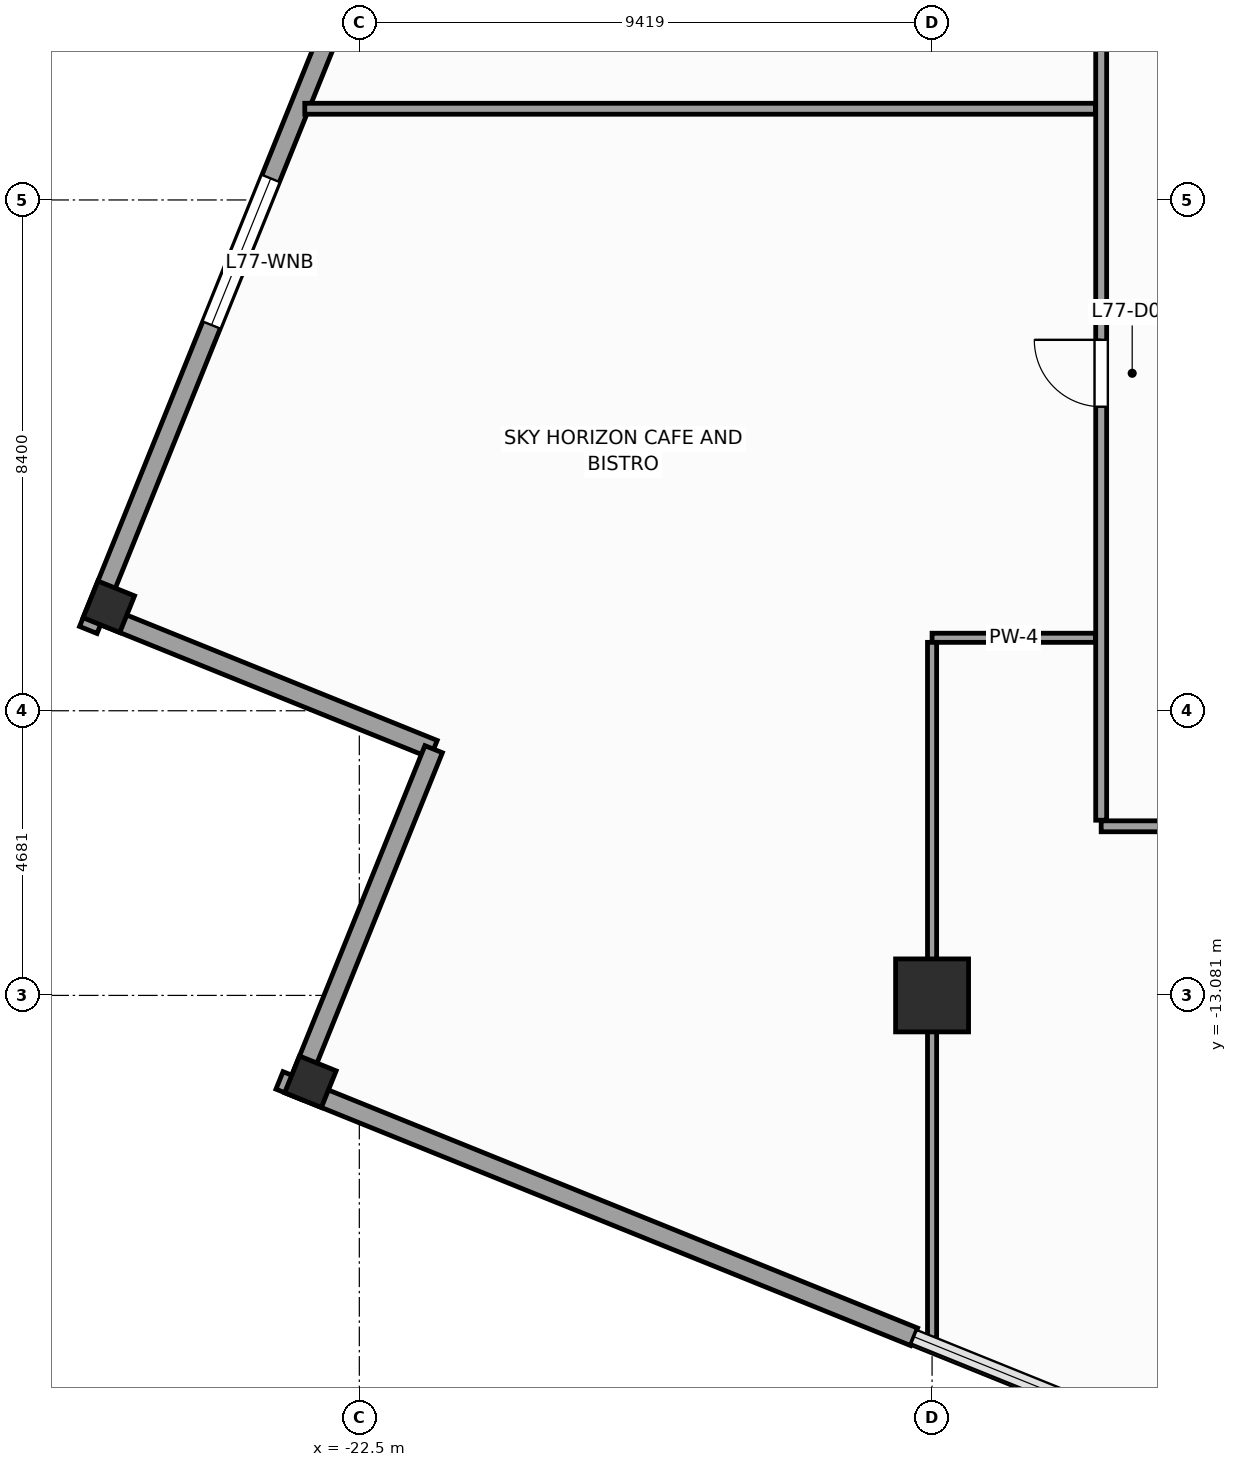
"""IFC4 building model, lengths in metres.
Left out: names, types, materials, properties, quantities, classifications, styles, units other than length and angle.
Written with IfcOpenShell. Run it as: python <this file> out.ifc"""

import sys

from ifc_helpers import new_model, si_unit, direction, frame, frame_2d, origin, origin_2d, place, context, subcontext, project, spatial, rectangle, extrude, source, transform, mapped, element, fill, save


model = new_model("IFC4")
c1 = context("Model", 3, precision=1e-05, world=origin(), true_north=direction((0.0, 1.0)))
c2 = subcontext(c1, "Body", "Model", "MODEL_VIEW")
j1 = project(units=[si_unit("LENGTHUNIT", "METRE"), si_unit("PLANEANGLEUNIT", "RADIAN")], contexts=[c1])
p1 = place(None, origin())
s1 = spatial("IfcSite", under=j1, at=p1, CompositionType="ELEMENT")
p2 = place(p1, origin())
s2 = spatial("IfcBuilding", under=s1, at=p2, CompositionType="ELEMENT")
p3 = place(p2, frame((0.0, 0.0, 312.0)))
s3 = spatial("IfcBuildingStorey", under=s2, at=p3, CompositionType="ELEMENT", Elevation=312.0)
m1 = source(origin(), c2, "Body", "SweptSolid", [
    extrude(rectangle(XDim=1.2, YDim=1.2, at=origin_2d()), origin(), (0.0, 0.0, 1.0), 4.8),
])
p4 = place(p3, frame((-13.081, -13.081, 0.0), z_axis=(0.0, 0.0, 1.0), x_axis=(1.0, 0.0, 0.0)))
e1 = element("IfcColumn", 1, at=p4, inside=s3, PredefinedType="COLUMN", context=c2, shape_type="MappedRepresentation", body=[
    mapped(m1, transform((0.0, 0.0, 0.0), scale=1.0)),
])
m2 = source(origin(), c2, "Body", "SweptSolid", [
    extrude(rectangle(XDim=0.65, YDim=0.65, at=origin_2d()), origin(), (0.0, 0.0, 1.0), 4.8),
])
for number, where, z_axis, x_axis in (
    (2, (-26.62, -6.69, 0.0), (0.0, 0.0, 1.0), (0.375, 0.927, 0.0)),
    (3, (-23.304, -14.501, 0.0), (0.0, 0.0, 1.0), (0.375, 0.927, 0.0)),
):
    element("IfcColumn", number, at=place(p3, frame(where, z_axis=z_axis, x_axis=x_axis)), inside=s3, PredefinedType="COLUMN", context=c2, shape_type="MappedRepresentation", body=[
        mapped(m2, transform((0.0, 0.0, 0.0), scale=1.0)),
    ])
p5 = place(p3, frame((-26.841, -6.784, 0.0), z_axis=(0.0, 0.0, 1.0), x_axis=(0.927171722085, -0.374636620962, 0.0)))
e4 = element("IfcWall", 4, at=p5, inside=s3, PredefinedType="STANDARD", context=c2, shape_type="SweptSolid", body=[
    extrude(rectangle(XDim=6.0, YDim=0.31, at=frame_2d((3.0, 0.0))), origin(), (0.0, 0.0, 1.0), 3.85),
])
p6 = place(p3, frame((-21.278, -9.032, 0.0), z_axis=(0.0, 0.0, 1.0), x_axis=(-0.374602739196, -0.927185411764, 0.0)))
e5 = element("IfcWall", 5, at=p6, inside=s3, PredefinedType="STANDARD", context=c2, shape_type="SweptSolid", body=[
    extrude(rectangle(XDim=6.155, YDim=0.31, at=frame_2d((3.078, 0.0))), origin(), (0.0, 0.0, 1.0), 4.55),
])
p7 = place(p3, frame((-20.343, 9.298, 0.0), z_axis=(0.0, 0.0, 1.0), x_axis=(-0.374607087443, -0.927183654967, 0.0)))
e6 = element("IfcWall", 6, at=p7, inside=s3, PredefinedType="STANDARD", context=c2, shape_type="SweptSolid", body=[
    extrude(rectangle(XDim=17.655, YDim=0.31, at=frame_2d((8.828, 0.0))), origin(), (0.0, 0.0, 1.0), 3.95),
])
p8 = place(p7, frame((9.646, 0.0, 0.65)))
e7 = element("IfcOpeningElement", 7, at=p8, cuts=e6, PredefinedType="OPENING", context=c2, shape_type="SweptSolid", body=[
    extrude(rectangle(XDim=2.6, YDim=3.0, at=frame_2d((1.3, 1.5))), frame((0.0, 0.165, 0.0), z_axis=(0.0, -1.0, 0.0), x_axis=(1.0, 0.0, 0.0)), (0.0, 0.0, 1.0), 0.33),
])
p9 = place(p3, frame((-23.813, -14.479, 0.0), z_axis=(0.0, 0.0, 1.0), x_axis=(0.927178527544, -0.374619777991, 0.0)))
e8 = element("IfcWall", 8, at=p9, inside=s3, PredefinedType="STANDARD", context=c2, shape_type="SweptSolid", body=[
    extrude(rectangle(XDim=11.255, YDim=0.31, at=frame_2d((5.627, 0.0))), origin(), (0.0, 0.0, 1.0), 3.95),
])
p10 = place(p3, frame((-10.3, -10.3, 0.0), z_axis=(0.0, 0.0, 1.0), x_axis=(1.0, 0.0, 0.0)))
e9 = element("IfcWall", 9, at=p10, inside=s3, PredefinedType="PARTITIONING", context=c2, shape_type="SweptSolid", body=[
    extrude(rectangle(XDim=21.2, YDim=0.18, at=frame_2d((10.6, 0.0))), origin(), (0.0, 0.0, 1.0), 4.55),
])
p11 = place(p10, frame((10.514, 0.0, 0.0)))
e10 = element("IfcOpeningElement", 10, at=p11, cuts=e9, PredefinedType="OPENING", context=c2, shape_type="SweptSolid", body=[
    extrude(rectangle(XDim=0.95, YDim=2.1, at=frame_2d((0.475, 1.05))), frame((0.0, 0.1, 0.0), z_axis=(0.0, -1.0, 0.0), x_axis=(1.0, 0.0, 0.0)), (0.0, 0.0, 1.0), 0.2),
])
p12 = place(p10, frame((16.236, 0.0, 0.0)))
e11 = element("IfcOpeningElement", 11, at=p12, cuts=e9, PredefinedType="OPENING", context=c2, shape_type="SweptSolid", body=[
    extrude(rectangle(XDim=1.1, YDim=2.2, at=frame_2d((0.55, 1.1))), frame((0.0, 0.1, 0.0), z_axis=(0.0, -1.0, 0.0), x_axis=(1.0, 0.0, 0.0)), (0.0, 0.0, 1.0), 0.2),
])
p13 = place(p10, frame((4.415, 0.0, 0.0)))
e12 = element("IfcOpeningElement", 12, at=p13, cuts=e9, PredefinedType="OPENING", context=c2, shape_type="SweptSolid", body=[
    extrude(rectangle(XDim=1.1, YDim=2.2, at=frame_2d((0.55, 1.1))), frame((0.0, 0.1, 0.0), z_axis=(0.0, -1.0, 0.0), x_axis=(1.0, 0.0, 0.0)), (0.0, 0.0, 1.0), 0.2),
])
p14 = place(p3, frame((-10.3, -10.2, 0.0), z_axis=(0.0, 0.0, 1.0), x_axis=(0.0, 1.0, 0.0)))
e13 = element("IfcWall", 13, at=p14, inside=s3, PredefinedType="PARTITIONING", context=c2, shape_type="SweptSolid", body=[
    extrude(rectangle(XDim=21.0, YDim=0.18, at=frame_2d((10.5, 0.0))), origin(), (0.0, 0.0, 1.0), 4.55),
])
p15 = place(p14, frame((6.8, 0.0, 0.0)))
e14 = element("IfcOpeningElement", 14, at=p15, cuts=e13, PredefinedType="OPENING", context=c2, shape_type="SweptSolid", body=[
    extrude(rectangle(XDim=1.1, YDim=2.2, at=frame_2d((0.55, 1.1))), frame((0.0, 0.1, 0.0), z_axis=(0.0, -1.0, 0.0), x_axis=(1.0, 0.0, 0.0)), (0.0, 0.0, 1.0), 0.2),
])
p16 = place(p3, frame((-10.395, 1.5, 0.0), z_axis=(0.0, 0.0, 1.0), x_axis=(-1.0, 0.0, 0.0)))
e15 = element("IfcWall", 15, at=p16, inside=s3, PredefinedType="PARTITIONING", context=c2, shape_type="SweptSolid", body=[
    extrude(rectangle(XDim=13.002, YDim=0.18, at=frame_2d((6.501, 0.0))), origin(), (0.0, 0.0, 1.0), 4.55),
])
p17 = place(p3, frame((-10.395, -7.2, 0.0), z_axis=(0.0, 0.0, 1.0), x_axis=(-1.0, 0.0, 0.0)))
e16 = element("IfcWall", 16, at=p17, inside=s3, PredefinedType="PARTITIONING", context=c2, shape_type="SweptSolid", body=[
    extrude(rectangle(XDim=2.686, YDim=0.15, at=frame_2d((1.343, 0.0))), origin(), (0.0, 0.0, 1.0), 4.55),
])
p18 = place(p3, frame((-13.081, -7.275, 0.0), z_axis=(0.0, 0.0, 1.0), x_axis=(0.0, -1.0, 0.0)))
e17 = element("IfcWall", 17, at=p18, inside=s3, PredefinedType="PARTITIONING", context=c2, shape_type="SweptSolid", body=[
    extrude(rectangle(XDim=11.443, YDim=0.15, at=frame_2d((5.721, 0.0))), origin(), (0.0, 0.0, 1.0), 3.65),
])
m3 = source(origin(), c2, "Body", "SweptSolid", [
    extrude(rectangle(XDim=2.6, YDim=3.0, at=frame_2d((1.3, 1.5))), frame((0.0, 0.03, 0.0), z_axis=(0.0, -1.0, 0.0), x_axis=(1.0, 0.0, 0.0)), (0.0, 0.0, 1.0), 0.06),
])
p19 = place(p8, origin())
e18 = element("IfcWindow", 18, at=p19, inside=s3, PartitioningType="SINGLE_PANEL", PredefinedType="WINDOW", context=c2, shape_type="MappedRepresentation", body=[
    mapped(m3, transform((0.0, 0.0, 0.0), scale=1.0)),
])
fill(e7, e18)
m4 = source(origin(), c2, "Body", "SweptSolid", [
    extrude(rectangle(XDim=1.1, YDim=2.2, at=frame_2d((0.55, 1.1))), frame((0.0, 0.025, 0.0), z_axis=(0.0, -1.0, 0.0), x_axis=(1.0, 0.0, 0.0)), (0.0, 0.0, 1.0), 0.05),
])
p20 = place(p15, origin())
e19 = element("IfcDoor", 19, at=p20, inside=s3, OperationType="SINGLE_SWING_RIGHT", PredefinedType="DOOR", context=c2, shape_type="MappedRepresentation", body=[
    mapped(m4, transform((0.0, 0.0, 0.0), scale=1.0)),
])
fill(e14, e19)
save(model, sys.argv[1])
